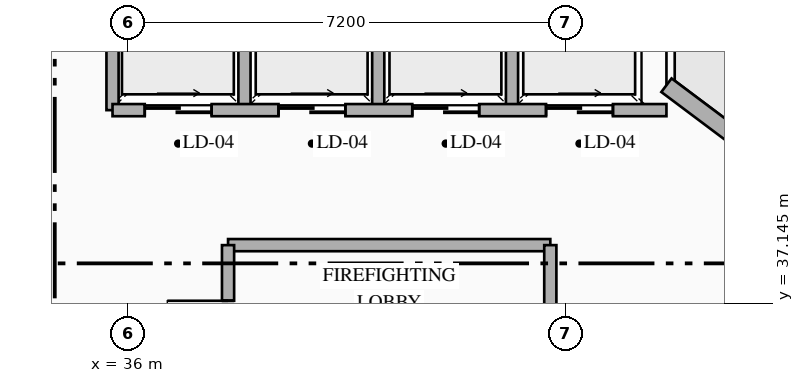
"""IFC4 building model, lengths in metres.
Left out: names, types, materials, properties, quantities, classifications, styles, units other than length and angle.
Written with IfcOpenShell. Run it as: python <this file> out.ifc"""

import sys

from ifc_helpers import new_model, si_unit, direction, frame, frame_2d, origin, place, context, subcontext, project, spatial, rectangle, extrude, element, fill, save


model = new_model("IFC4")
c1 = context("Model", 3, precision=1e-05, world=origin(), true_north=direction((0.0, 1.0)))
c2 = subcontext(c1, "Body", "Model", "MODEL_VIEW")
j1 = project(units=[si_unit("LENGTHUNIT", "METRE"), si_unit("PLANEANGLEUNIT", "RADIAN")], contexts=[c1])
p1 = place(None, origin())
s1 = spatial("IfcSite", under=j1, at=p1, CompositionType="ELEMENT")
p2 = place(p1, origin())
s2 = spatial("IfcBuilding", under=s1, at=p2, CompositionType="ELEMENT")
p3 = place(p2, frame((0.0, 0.0, 178.05)))
s3 = spatial("IfcBuildingStorey", under=s2, at=p3, CompositionType="ELEMENT", Elevation=178.05)
p4 = place(p3, frame((44.86, 40.73, 0.0), z_axis=(0.0, 0.0, 1.0), x_axis=(0.800007624502, -0.599989833863, 0.0)))
e1 = element("IfcWall", 1, at=p4, inside=s3, PredefinedType="STANDARD", context=c2, shape_type="SweptSolid", body=[
    extrude(rectangle(XDim=19.212, YDim=0.28, at=frame_2d((9.606, 0.0))), origin(), (0.0, 0.0, 1.0), 3.3),
])
p5 = place(p4, frame((1.755, 0.0, 0.0)))
e2 = element("IfcOpeningElement", 2, at=p5, cuts=e1, PredefinedType="OPENING", context=c2, shape_type="SweptSolid", body=[
    extrude(rectangle(XDim=1.1, YDim=2.2, at=frame_2d((0.55, 1.1))), frame((0.0, 0.15, 0.0), z_axis=(0.0, -1.0, 0.0), x_axis=(1.0, 0.0, 0.0)), (0.0, 0.0, 1.0), 0.3),
])
p6 = place(p4, frame((13.509, 0.0, 0.85)))
e3 = element("IfcOpeningElement", 3, at=p6, cuts=e1, PredefinedType="OPENING", context=c2, shape_type="SweptSolid", body=[
    extrude(rectangle(XDim=1.8, YDim=2.1, at=frame_2d((0.9, 1.05))), frame((0.0, 0.15, 0.0), z_axis=(0.0, -1.0, 0.0), x_axis=(1.0, 0.0, 0.0)), (0.0, 0.0, 1.0), 0.3),
])
p7 = place(p3, frame((37.65, 38.1, 0.0), z_axis=(0.0, 0.0, 1.0), x_axis=(1.0, 0.0, 0.0)))
e4 = element("IfcWall", 4, at=p7, inside=s3, PredefinedType="STANDARD", context=c2, shape_type="SweptSolid", body=[
    extrude(rectangle(XDim=5.3, YDim=0.2, at=frame_2d((2.65, 0.0))), origin(), (0.0, 0.0, 1.0), 3.3),
])
p8 = place(p3, frame((42.95, 35.27, 0.0), z_axis=(0.0, 0.0, 1.0), x_axis=(0.0, 1.0, 0.0)))
e5 = element("IfcWall", 5, at=p8, inside=s3, PredefinedType="STANDARD", context=c2, shape_type="SweptSolid", body=[
    extrude(rectangle(XDim=2.83, YDim=0.2, at=frame_2d((1.415, 0.0))), origin(), (0.0, 0.0, 1.0), 3.3),
])
p9 = place(p3, frame((37.65, 35.27, 0.0), z_axis=(0.0, 0.0, 1.0), x_axis=(0.0, 1.0, 0.0)))
e6 = element("IfcWall", 6, at=p9, inside=s3, PredefinedType="STANDARD", context=c2, shape_type="SweptSolid", body=[
    extrude(rectangle(XDim=2.83, YDim=0.2, at=frame_2d((1.415, 0.0))), origin(), (0.0, 0.0, 1.0), 3.3),
])
p10 = place(p9, frame((0.915, 0.0, 0.0)))
e7 = element("IfcOpeningElement", 7, at=p10, cuts=e6, PredefinedType="OPENING", context=c2, shape_type="SweptSolid", body=[
    extrude(rectangle(XDim=1.0, YDim=2.2, at=frame_2d((0.5, 1.1))), frame((0.0, 0.11, 0.0), z_axis=(0.0, -1.0, 0.0), x_axis=(1.0, 0.0, 0.0)), (0.0, 0.0, 1.0), 0.22),
])
for number, where, z_axis, x_axis in (
    (8, (35.75, 40.32, 0.0), (0.0, 0.0, 1.0), (0.0, 1.0, 0.0)),
    (9, (37.92, 40.32, 0.0), (0.0, 0.0, 1.0), (0.0, 1.0, 0.0)),
    (10, (40.12, 40.32, 0.0), (0.0, 0.0, 1.0), (0.0, 1.0, 0.0)),
    (11, (42.32, 40.32, 0.0), (0.0, 0.0, 1.0), (0.0, 1.0, 0.0)),
):
    element("IfcWall", number, at=place(p3, frame(where, z_axis=z_axis, x_axis=x_axis)), inside=s3, PredefinedType="STANDARD", context=c2, shape_type="SweptSolid", body=[
        extrude(rectangle(XDim=2.16, YDim=0.2, at=frame_2d((1.08, 0.0))), origin(), (0.0, 0.0, 1.0), 3.3),
    ])
p11 = place(p3, frame((35.75, 40.32, 0.0), z_axis=(0.0, 0.0, 1.0), x_axis=(1.0, 0.0, 0.0)))
e12 = element("IfcWall", 12, at=p11, inside=s3, PredefinedType="STANDARD", context=c2, shape_type="SweptSolid", body=[
    extrude(rectangle(XDim=9.11, YDim=0.2, at=frame_2d((4.555, 0.0))), origin(), (0.0, 0.0, 1.0), 3.3),
])
p12 = place(p11, frame((0.53, 0.0, 0.0)))
e13 = element("IfcOpeningElement", 13, at=p12, cuts=e12, PredefinedType="OPENING", context=c2, shape_type="SweptSolid", body=[
    extrude(rectangle(XDim=1.1, YDim=2.18, at=frame_2d((0.55, 1.09))), frame((0.0, 0.11, 0.0), z_axis=(0.0, -1.0, 0.0), x_axis=(1.0, 0.0, 0.0)), (0.0, 0.0, 1.0), 0.22),
])
p13 = place(p11, frame((2.73, 0.0, 0.0)))
e14 = element("IfcOpeningElement", 14, at=p13, cuts=e12, PredefinedType="OPENING", context=c2, shape_type="SweptSolid", body=[
    extrude(rectangle(XDim=1.1, YDim=2.18, at=frame_2d((0.55, 1.09))), frame((0.0, 0.11, 0.0), z_axis=(0.0, -1.0, 0.0), x_axis=(1.0, 0.0, 0.0)), (0.0, 0.0, 1.0), 0.22),
])
p14 = place(p11, frame((4.93, 0.0, 0.0)))
e15 = element("IfcOpeningElement", 15, at=p14, cuts=e12, PredefinedType="OPENING", context=c2, shape_type="SweptSolid", body=[
    extrude(rectangle(XDim=1.1, YDim=2.18, at=frame_2d((0.55, 1.09))), frame((0.0, 0.11, 0.0), z_axis=(0.0, -1.0, 0.0), x_axis=(1.0, 0.0, 0.0)), (0.0, 0.0, 1.0), 0.22),
])
p15 = place(p11, frame((7.13, 0.0, 0.0)))
e16 = element("IfcOpeningElement", 16, at=p15, cuts=e12, PredefinedType="OPENING", context=c2, shape_type="SweptSolid", body=[
    extrude(rectangle(XDim=1.1, YDim=2.18, at=frame_2d((0.55, 1.09))), frame((0.0, 0.11, 0.0), z_axis=(0.0, -1.0, 0.0), x_axis=(1.0, 0.0, 0.0)), (0.0, 0.0, 1.0), 0.22),
])
p16 = place(p3, frame((43.63, 31.973, 0.0), z_axis=(0.0, 0.0, 1.0), x_axis=(0.599975099311, 0.800018674911, 0.0)))
e17 = element("IfcWall", 17, at=p16, inside=s3, PredefinedType="PARTITIONING", context=c2, shape_type="SweptSolid", body=[
    extrude(rectangle(XDim=7.844, YDim=0.15, at=frame_2d((3.922, 0.0))), origin(), (0.0, 0.0, 1.0), 3.3),
])
p17 = place(p10, origin())
e18 = element("IfcDoor", 18, at=p17, inside=s3, OperationType="SINGLE_SWING_RIGHT", PredefinedType="DOOR", context=c2, shape_type="SweptSolid", body=[
    extrude(rectangle(XDim=1.0, YDim=2.2, at=frame_2d((0.5, 1.1))), frame((0.0, 0.025, 0.0), z_axis=(0.0, -1.0, 0.0), x_axis=(1.0, 0.0, 0.0)), (0.0, 0.0, 1.0), 0.05),
])
fill(e7, e18)
p18 = place(p12, origin())
e19 = element("IfcDoor", 19, at=p18, inside=s3, OperationType="SLIDING_TO_RIGHT", PredefinedType="USERDEFINED", context=c2, shape_type="SweptSolid", body=[
    extrude(rectangle(XDim=1.1, YDim=2.18, at=frame_2d((0.55, 1.09))), frame((0.0, 0.025, 0.0), z_axis=(0.0, -1.0, 0.0), x_axis=(1.0, 0.0, 0.0)), (0.0, 0.0, 1.0), 0.05),
])
fill(e13, e19)
p19 = place(p13, origin())
e20 = element("IfcDoor", 20, at=p19, inside=s3, OperationType="SLIDING_TO_RIGHT", PredefinedType="USERDEFINED", context=c2, shape_type="SweptSolid", body=[
    extrude(rectangle(XDim=1.1, YDim=2.18, at=frame_2d((0.55, 1.09))), frame((0.0, 0.025, 0.0), z_axis=(0.0, -1.0, 0.0), x_axis=(1.0, 0.0, 0.0)), (0.0, 0.0, 1.0), 0.05),
])
fill(e14, e20)
p20 = place(p14, origin())
e21 = element("IfcDoor", 21, at=p20, inside=s3, OperationType="SLIDING_TO_RIGHT", PredefinedType="USERDEFINED", context=c2, shape_type="SweptSolid", body=[
    extrude(rectangle(XDim=1.1, YDim=2.18, at=frame_2d((0.55, 1.09))), frame((0.0, 0.025, 0.0), z_axis=(0.0, -1.0, 0.0), x_axis=(1.0, 0.0, 0.0)), (0.0, 0.0, 1.0), 0.05),
])
fill(e15, e21)
p21 = place(p15, origin())
e22 = element("IfcDoor", 22, at=p21, inside=s3, OperationType="SLIDING_TO_RIGHT", PredefinedType="USERDEFINED", context=c2, shape_type="SweptSolid", body=[
    extrude(rectangle(XDim=1.1, YDim=2.18, at=frame_2d((0.55, 1.09))), frame((0.0, 0.025, 0.0), z_axis=(0.0, -1.0, 0.0), x_axis=(1.0, 0.0, 0.0)), (0.0, 0.0, 1.0), 0.05),
])
fill(e16, e22)
save(model, sys.argv[1])
